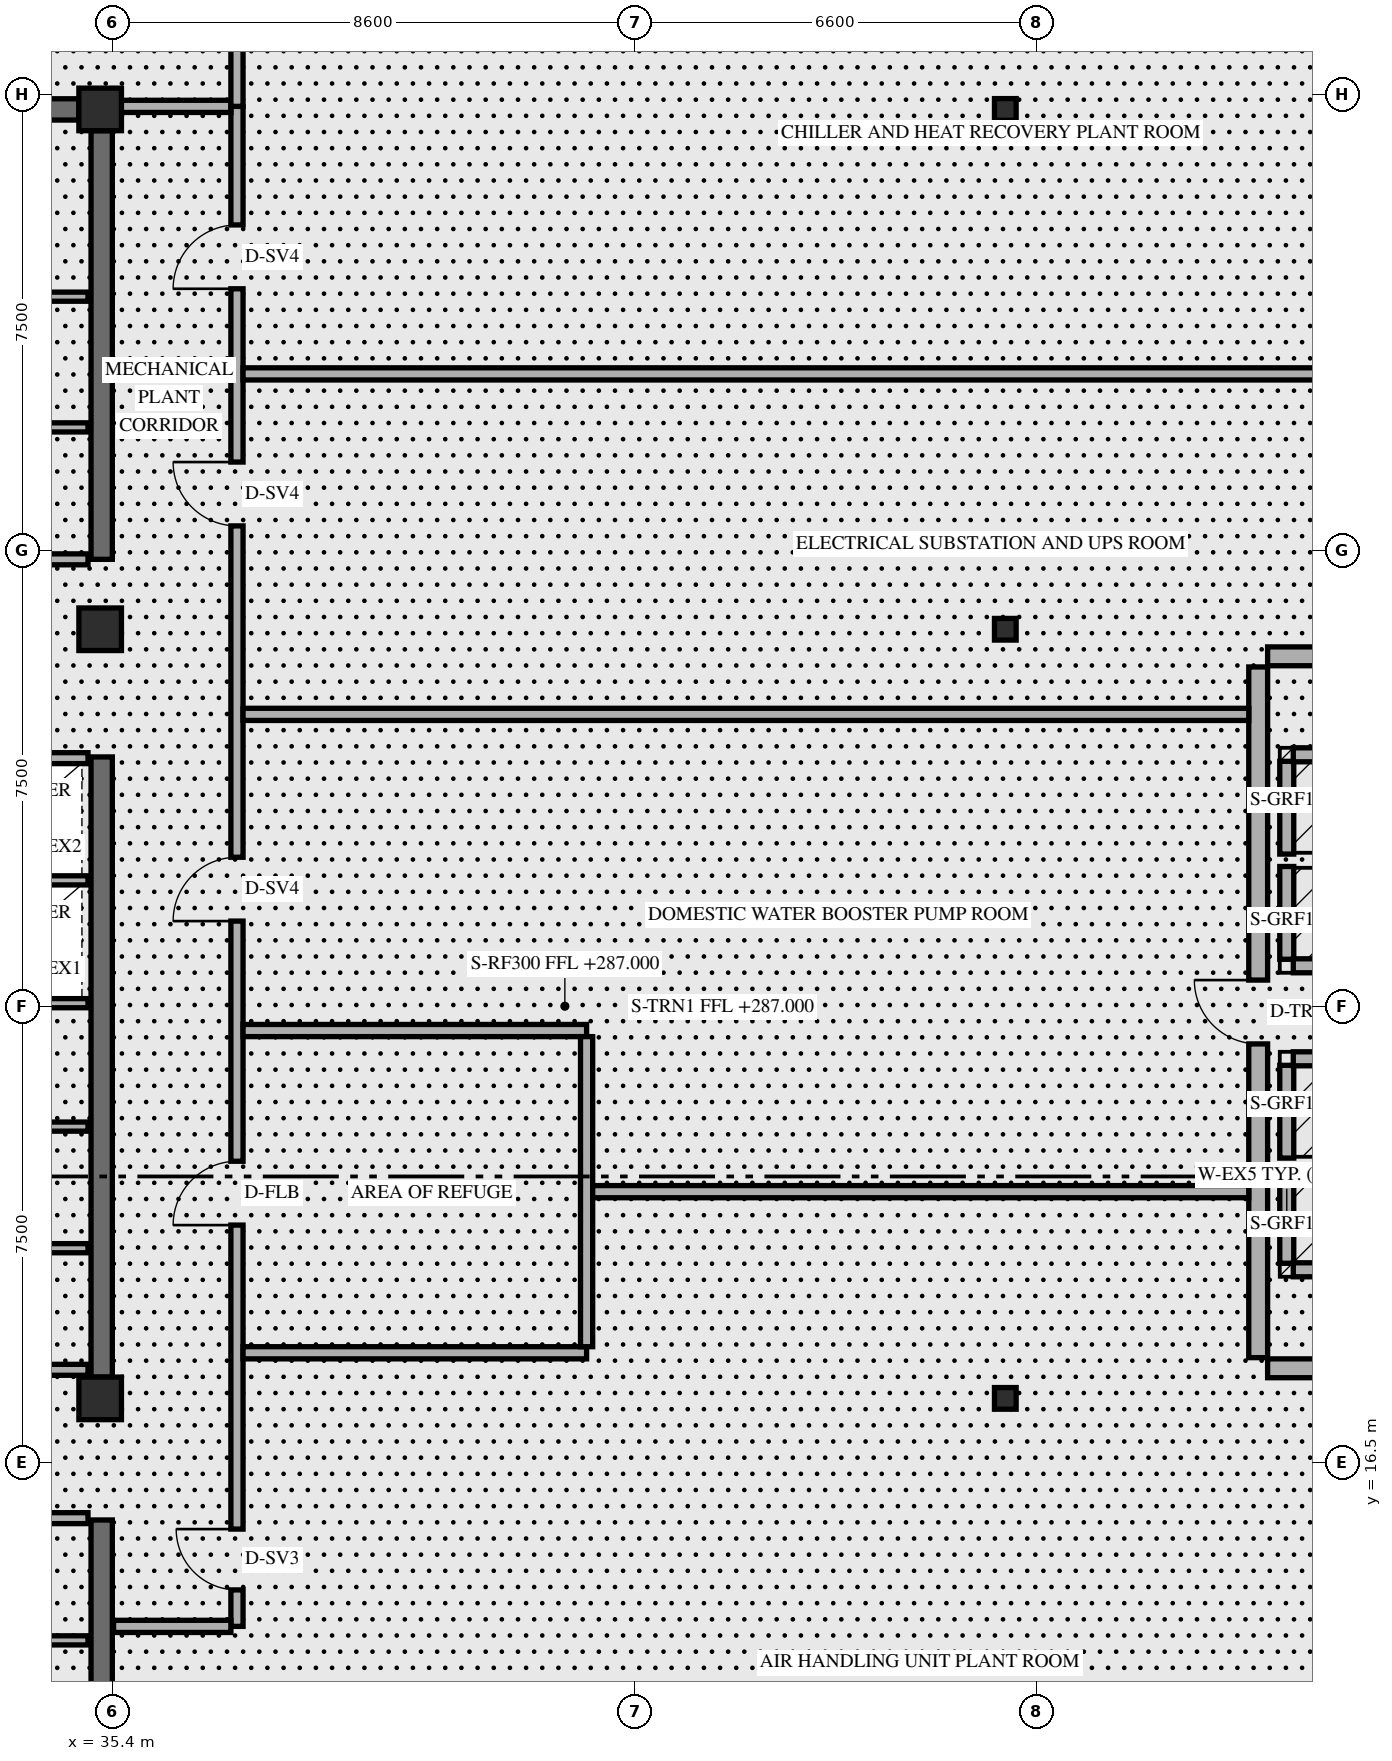
"""IFC4 building model, lengths in metres.
Left out: names, types, materials, properties, quantities, classifications, styles, units other than length and angle.
Written with IfcOpenShell. Run it as: python <this file> out.ifc"""

import sys

from ifc_helpers import new_model, si_unit, direction, frame, frame_2d, origin, origin_2d, place, context, subcontext, project, spatial, rectangle, hollow_rectangle, extrude, element, fill, save


model = new_model("IFC4")
c1 = context("Model", 3, precision=1e-05, world=origin(), true_north=direction((0.0, 1.0)))
c2 = subcontext(c1, "Body", "Model", "MODEL_VIEW")
j1 = project(units=[si_unit("LENGTHUNIT", "METRE"), si_unit("PLANEANGLEUNIT", "RADIAN")], contexts=[c1])
p1 = place(None, origin())
s1 = spatial("IfcSite", under=j1, at=p1, CompositionType="ELEMENT")
p2 = place(p1, origin())
s2 = spatial("IfcBuilding", under=s1, at=p2, CompositionType="ELEMENT")
p3 = place(p2, frame((0.0, 0.0, 287.0)))
s3 = spatial("IfcBuildingStorey", under=s2, at=p3, CompositionType="ELEMENT", Elevation=287.0)
p4 = place(p3, frame((35.225, 9.6, 0.0), z_axis=(0.0, 0.0, 1.0), x_axis=(0.0, 1.0, 0.0)))
e1 = element("IfcWall", 1, at=p4, inside=s3, PredefinedType="SHEAR", context=c2, shape_type="SweptSolid", body=[
    extrude(rectangle(XDim=5.95, YDim=0.35, at=frame_2d((2.975, 0.0))), origin(), (0.0, 0.0, 1.0), 5.161),
])
p5 = place(p3, frame((35.225, 17.9, 0.0), z_axis=(0.0, 0.0, 1.0), x_axis=(0.0, 1.0, 0.0)))
e2 = element("IfcWall", 2, at=p5, inside=s3, PredefinedType="SHEAR", context=c2, shape_type="SweptSolid", body=[
    extrude(rectangle(XDim=10.2, YDim=0.35, at=frame_2d((5.1, 0.0))), origin(), (0.0, 0.0, 1.0), 5.161),
])
p6 = place(p3, frame((35.225, 31.35, 0.0), z_axis=(0.0, 0.0, 1.0), x_axis=(0.0, 1.0, 0.0)))
e3 = element("IfcWall", 3, at=p6, inside=s3, PredefinedType="SHEAR", context=c2, shape_type="SweptSolid", body=[
    extrude(rectangle(XDim=7.05, YDim=0.35, at=frame_2d((3.525, 0.0))), origin(), (0.0, 0.0, 1.0), 5.161),
])
p7 = place(p3, frame((24.55, 38.75, 0.0), z_axis=(0.0, 0.0, 1.0), x_axis=(1.0, 0.0, 0.0)))
e4 = element("IfcWall", 4, at=p7, inside=s3, PredefinedType="SHEAR", context=c2, shape_type="SweptSolid", body=[
    extrude(rectangle(XDim=10.3, YDim=0.35, at=frame_2d((5.15, 0.0))), origin(), (0.0, 0.0, 1.0), 5.7),
])
p8 = place(p7, frame((4.5, 0.0, 0.0)))
e5 = element("IfcOpeningElement", 5, at=p8, cuts=e4, PredefinedType="OPENING", context=c2, shape_type="SweptSolid", body=[
    extrude(rectangle(XDim=1.0, YDim=2.15, at=frame_2d((0.5, 1.075))), frame((0.0, 0.185, 0.0), z_axis=(0.0, -1.0, 0.0), x_axis=(1.0, 0.0, 0.0)), (0.0, 0.0, 1.0), 0.37),
])
for number, where, z_axis, x_axis in (
    (6, (35.2, 17.55, 0.0), (0.0, 0.0, 1.0), (1.0, 0.0, 0.0)),
    (7, (35.2, 30.2, 0.0), (0.0, 0.0, 1.0), (1.0, 0.0, 0.0)),
    (8, (35.2, 38.75, 0.0), (0.0, 0.0, 1.0), (1.0, 0.0, 0.0)),
):
    element("IfcColumn", number, at=place(p3, frame(where, z_axis=z_axis, x_axis=x_axis)), inside=s3, PredefinedType="COLUMN", context=c2, shape_type="SweptSolid", body=[
        extrude(rectangle(XDim=0.7, YDim=0.7, at=origin_2d()), origin(), (0.0, 0.0, 1.0), 5.996),
    ])
for number, where, z_axis, x_axis in (
    (9, (49.981, 17.55, 0.0), (0.035, 0.0, 0.999), (0.0, 1.0, 0.0)),
    (10, (49.981, 30.2, 0.0), (0.035, 0.0, 0.999), (0.0, 1.0, 0.0)),
    (11, (49.981, 38.75, 0.0), (0.035, 0.0, 0.999), (0.0, 1.0, 0.0)),
):
    element("IfcColumn", number, at=place(p3, frame(where, z_axis=z_axis, x_axis=x_axis)), inside=s3, PredefinedType="COLUMN", context=c2, shape_type="SweptSolid", body=[
        extrude(hollow_rectangle(XDim=0.356, YDim=0.356, WallThickness=0.016, at=origin_2d()), origin(), (0.0, 0.0, 1.0), 6.0),
    ])
for number, where, z_axis, x_axis in (
    (12, (54.4, 18.045, 0.0), (0.0, 0.0, 1.0), (1.0, 0.0, 0.0)),
    (13, (54.4, 29.755, 0.0), (0.0, 0.0, 1.0), (1.0, 0.0, 0.0)),
):
    element("IfcWall", number, at=place(p3, frame(where, z_axis=z_axis, x_axis=x_axis)), inside=s3, PredefinedType="SOLIDWALL", context=c2, shape_type="SweptSolid", body=[
        extrude(rectangle(XDim=7.98, YDim=0.31, at=frame_2d((3.99, 0.0))), origin(), (0.0, 0.0, 1.0), 5.219),
    ])
p9 = place(p3, frame((54.245, 18.22, 0.0), z_axis=(0.0, 0.0, 1.0), x_axis=(0.0, 1.0, 0.0)))
e14 = element("IfcWall", 14, at=p9, inside=s3, PredefinedType="SOLIDWALL", context=c2, shape_type="SweptSolid", body=[
    extrude(rectangle(XDim=11.36, YDim=0.31, at=frame_2d((5.68, 0.0))), origin(), (0.0, 0.0, 1.0), 5.7),
])
p10 = place(p9, frame((5.16, 0.0, 0.0)))
e15 = element("IfcOpeningElement", 15, at=p10, cuts=e14, PredefinedType="OPENING", context=c2, shape_type="SweptSolid", body=[
    extrude(rectangle(XDim=1.05, YDim=2.15, at=frame_2d((0.525, 1.075))), frame((0.0, 0.165, 0.0), z_axis=(0.0, -1.0, 0.0), x_axis=(1.0, 0.0, 0.0)), (0.0, 0.0, 1.0), 0.33),
])
for number, where, z_axis, x_axis in (
    (16, (54.715, 19.772, 0.0), (0.0, 0.0, 1.0), (0.0, 1.0, 0.0)),
    (17, (54.715, 21.502, 0.0), (0.0, 0.0, 1.0), (0.0, 1.0, 0.0)),
):
    element("IfcWall", number, at=place(p3, frame(where, z_axis=z_axis, x_axis=x_axis)), inside=s3, PredefinedType="SOLIDWALL", context=c2, shape_type="SweptSolid", body=[
        extrude(rectangle(XDim=1.526, YDim=0.23, at=frame_2d((0.763, 0.0))), origin(), (0.0, 0.0, 1.0), 2.264),
    ])
p11 = place(p3, frame((54.822, 19.665, 0.0), z_axis=(0.0, 0.0, 1.0), x_axis=(1.0, 0.0, 0.0)))
e18 = element("IfcWall", 18, at=p11, inside=s3, PredefinedType="SOLIDWALL", context=c2, shape_type="SweptSolid", body=[
    extrude(rectangle(XDim=3.836, YDim=0.23, at=frame_2d((1.918, 0.0))), origin(), (0.0, 0.0, 1.0), 2.264),
])
p12 = place(p11, frame((1.268, 0.0, 0.78)))
e19 = element("IfcOpeningElement", 19, at=p12, cuts=e18, PredefinedType="OPENING", context=c2, shape_type="SweptSolid", body=[
    extrude(rectangle(XDim=1.3, YDim=1.25, at=frame_2d((0.65, 0.625))), frame((0.0, 0.125, 0.0), z_axis=(0.0, -1.0, 0.0), x_axis=(1.0, 0.0, 0.0)), (0.0, 0.0, 1.0), 0.25),
])
p13 = place(p3, frame((54.822, 23.135, 0.0), z_axis=(0.0, 0.0, 1.0), x_axis=(1.0, 0.0, 0.0)))
e20 = element("IfcWall", 20, at=p13, inside=s3, PredefinedType="SOLIDWALL", context=c2, shape_type="SweptSolid", body=[
    extrude(rectangle(XDim=3.836, YDim=0.23, at=frame_2d((1.918, 0.0))), origin(), (0.0, 0.0, 1.0), 2.264),
])
p14 = place(p13, frame((1.438, 0.0, 0.0)))
e21 = element("IfcOpeningElement", 21, at=p14, cuts=e20, PredefinedType="OPENING", context=c2, shape_type="SweptSolid", body=[
    extrude(rectangle(XDim=0.96, YDim=2.08, at=frame_2d((0.48, 1.04))), frame((0.0, 0.125, 0.0), z_axis=(0.0, -1.0, 0.0), x_axis=(1.0, 0.0, 0.0)), (0.0, 0.0, 1.0), 0.25),
])
for number, where, z_axis, x_axis in (
    (22, (54.715, 24.772, 0.0), (0.0, 0.0, 1.0), (0.0, 1.0, 0.0)),
    (23, (54.715, 26.502, 0.0), (0.0, 0.0, 1.0), (0.0, 1.0, 0.0)),
):
    element("IfcWall", number, at=place(p3, frame(where, z_axis=z_axis, x_axis=x_axis)), inside=s3, PredefinedType="SOLIDWALL", context=c2, shape_type="SweptSolid", body=[
        extrude(rectangle(XDim=1.526, YDim=0.23, at=frame_2d((0.763, 0.0))), origin(), (0.0, 0.0, 1.0), 2.264),
    ])
p15 = place(p3, frame((54.822, 24.665, 0.0), z_axis=(0.0, 0.0, 1.0), x_axis=(1.0, 0.0, 0.0)))
e24 = element("IfcWall", 24, at=p15, inside=s3, PredefinedType="SOLIDWALL", context=c2, shape_type="SweptSolid", body=[
    extrude(rectangle(XDim=3.836, YDim=0.23, at=frame_2d((1.918, 0.0))), origin(), (0.0, 0.0, 1.0), 2.264),
])
p16 = place(p15, frame((1.438, 0.0, 0.0)))
e25 = element("IfcOpeningElement", 25, at=p16, cuts=e24, PredefinedType="OPENING", context=c2, shape_type="SweptSolid", body=[
    extrude(rectangle(XDim=0.96, YDim=2.08, at=frame_2d((0.48, 1.04))), frame((0.0, 0.125, 0.0), z_axis=(0.0, -1.0, 0.0), x_axis=(1.0, 0.0, 0.0)), (0.0, 0.0, 1.0), 0.25),
])
p17 = place(p3, frame((54.822, 28.135, 0.0), z_axis=(0.0, 0.0, 1.0), x_axis=(1.0, 0.0, 0.0)))
e26 = element("IfcWall", 26, at=p17, inside=s3, PredefinedType="SOLIDWALL", context=c2, shape_type="SweptSolid", body=[
    extrude(rectangle(XDim=3.836, YDim=0.23, at=frame_2d((1.918, 0.0))), origin(), (0.0, 0.0, 1.0), 2.264),
])
p18 = place(p17, frame((1.268, 0.0, 0.78)))
e27 = element("IfcOpeningElement", 27, at=p18, cuts=e26, PredefinedType="OPENING", context=c2, shape_type="SweptSolid", body=[
    extrude(rectangle(XDim=1.3, YDim=1.25, at=frame_2d((0.65, 0.625))), frame((0.0, 0.125, 0.0), z_axis=(0.0, -1.0, 0.0), x_axis=(1.0, 0.0, 0.0)), (0.0, 0.0, 1.0), 0.25),
])
p19 = place(p3, frame((32.74, 15.58, 0.0), z_axis=(0.0, 0.0, 1.0), x_axis=(1.0, 0.0, 0.0)))
e28 = element("IfcWall", 28, at=p19, inside=s3, PredefinedType="STANDARD", context=c2, shape_type="SweptSolid", body=[
    extrude(rectangle(XDim=2.26, YDim=0.18, at=frame_2d((1.13, 0.0))), origin(), (0.0, 0.0, 1.0), 5.7),
])
p20 = place(p3, frame((32.74, 13.57, 0.0), z_axis=(0.0, 0.0, 1.0), x_axis=(1.0, 0.0, 0.0)))
e29 = element("IfcWall", 29, at=p20, inside=s3, PredefinedType="STANDARD", context=c2, shape_type="SweptSolid", body=[
    extrude(rectangle(XDim=2.26, YDim=0.15, at=frame_2d((1.13, 0.0))), origin(), (0.0, 0.0, 1.0), 5.7),
])
for number, where, z_axis, x_axis in (
    (30, (32.74, 18.02, 0.0), (0.0, 0.0, 1.0), (1.0, 0.0, 0.0)),
    (31, (32.74, 28.08, 0.0), (0.0, 0.0, 1.0), (1.0, 0.0, 0.0)),
):
    element("IfcWall", number, at=place(p3, frame(where, z_axis=z_axis, x_axis=x_axis)), inside=s3, PredefinedType="STANDARD", context=c2, shape_type="SweptSolid", body=[
        extrude(rectangle(XDim=2.26, YDim=0.18, at=frame_2d((1.13, 0.0))), origin(), (0.0, 0.0, 1.0), 5.7),
    ])
for number, where, z_axis, x_axis in (
    (32, (32.74, 20.02, 0.0), (0.0, 0.0, 1.0), (1.0, 0.0, 0.0)),
    (33, (32.74, 22.02, 0.0), (0.0, 0.0, 1.0), (1.0, 0.0, 0.0)),
    (34, (32.74, 24.05, 0.0), (0.0, 0.0, 1.0), (1.0, 0.0, 0.0)),
    (35, (32.74, 26.07, 0.0), (0.0, 0.0, 1.0), (1.0, 0.0, 0.0)),
):
    element("IfcWall", number, at=place(p3, frame(where, z_axis=z_axis, x_axis=x_axis)), inside=s3, PredefinedType="STANDARD", context=c2, shape_type="SweptSolid", body=[
        extrude(rectangle(XDim=2.26, YDim=0.15, at=frame_2d((1.13, 0.0))), origin(), (0.0, 0.0, 1.0), 5.7),
    ])
p21 = place(p3, frame((32.74, 31.35, 0.0), z_axis=(0.0, 0.0, 1.0), x_axis=(1.0, 0.0, 0.0)))
e36 = element("IfcWall", 36, at=p21, inside=s3, PredefinedType="STANDARD", context=c2, shape_type="SweptSolid", body=[
    extrude(rectangle(XDim=2.26, YDim=0.18, at=frame_2d((1.13, 0.0))), origin(), (0.0, 0.0, 1.0), 5.7),
])
for number, where, z_axis, x_axis in (
    (37, (32.74, 33.52, 0.0), (0.0, 0.0, 1.0), (1.0, 0.0, 0.0)),
    (38, (32.74, 35.67, 0.0), (0.0, 0.0, 1.0), (1.0, 0.0, 0.0)),
):
    element("IfcWall", number, at=place(p3, frame(where, z_axis=z_axis, x_axis=x_axis)), inside=s3, PredefinedType="STANDARD", context=c2, shape_type="SweptSolid", body=[
        extrude(rectangle(XDim=2.26, YDim=0.15, at=frame_2d((1.13, 0.0))), origin(), (0.0, 0.0, 1.0), 5.7),
    ])
p22 = place(p3, frame((37.45, 13.8, 0.0), z_axis=(0.0, 0.0, 1.0), x_axis=(0.0, 1.0, 0.0)))
e39 = element("IfcWall", 39, at=p22, inside=s3, PredefinedType="STANDARD", context=c2, shape_type="SweptSolid", body=[
    extrude(rectangle(XDim=25.0, YDim=0.2, at=frame_2d((12.5, 0.0))), origin(), (0.0, 0.0, 1.0), 5.143),
])
p23 = place(p22, frame((6.6, 0.0, 0.0)))
e40 = element("IfcOpeningElement", 40, at=p23, cuts=e39, PredefinedType="OPENING", context=c2, shape_type="SweptSolid", body=[
    extrude(rectangle(XDim=1.05, YDim=2.15, at=frame_2d((0.525, 1.075))), frame((0.0, 0.11, 0.0), z_axis=(0.0, -1.0, 0.0), x_axis=(1.0, 0.0, 0.0)), (0.0, 0.0, 1.0), 0.22),
])
p24 = place(p22, frame((0.6, 0.0, 0.0)))
e41 = element("IfcOpeningElement", 41, at=p24, cuts=e39, PredefinedType="OPENING", context=c2, shape_type="SweptSolid", body=[
    extrude(rectangle(XDim=1.0, YDim=2.15, at=frame_2d((0.5, 1.075))), frame((0.0, 0.11, 0.0), z_axis=(0.0, -1.0, 0.0), x_axis=(1.0, 0.0, 0.0)), (0.0, 0.0, 1.0), 0.22),
])
p25 = place(p22, frame((11.6, 0.0, 0.0)))
e42 = element("IfcOpeningElement", 42, at=p25, cuts=e39, PredefinedType="OPENING", context=c2, shape_type="SweptSolid", body=[
    extrude(rectangle(XDim=1.05, YDim=2.15, at=frame_2d((0.525, 1.075))), frame((0.0, 0.11, 0.0), z_axis=(0.0, -1.0, 0.0), x_axis=(1.0, 0.0, 0.0)), (0.0, 0.0, 1.0), 0.22),
])
p26 = place(p22, frame((18.1, 0.0, 0.0)))
e43 = element("IfcOpeningElement", 43, at=p26, cuts=e39, PredefinedType="OPENING", context=c2, shape_type="SweptSolid", body=[
    extrude(rectangle(XDim=1.05, YDim=2.15, at=frame_2d((0.525, 1.075))), frame((0.0, 0.11, 0.0), z_axis=(0.0, -1.0, 0.0), x_axis=(1.0, 0.0, 0.0)), (0.0, 0.0, 1.0), 0.22),
])
p27 = place(p22, frame((22.0, 0.0, 0.0)))
e44 = element("IfcOpeningElement", 44, at=p27, cuts=e39, PredefinedType="OPENING", context=c2, shape_type="SweptSolid", body=[
    extrude(rectangle(XDim=1.05, YDim=2.15, at=frame_2d((0.525, 1.075))), frame((0.0, 0.11, 0.0), z_axis=(0.0, -1.0, 0.0), x_axis=(1.0, 0.0, 0.0)), (0.0, 0.0, 1.0), 0.22),
])
p28 = place(p3, frame((35.42, 13.8, 0.0), z_axis=(0.0, 0.0, 1.0), x_axis=(1.0, 0.0, 0.0)))
e45 = element("IfcWall", 45, at=p28, inside=s3, PredefinedType="STANDARD", context=c2, shape_type="SweptSolid", body=[
    extrude(rectangle(XDim=1.93, YDim=0.2, at=frame_2d((0.965, 0.0))), origin(), (0.0, 0.0, 1.0), 5.379),
])
p29 = place(p3, frame((35.42, 38.8, 0.0), z_axis=(0.0, 0.0, 1.0), x_axis=(1.0, 0.0, 0.0)))
e46 = element("IfcWall", 46, at=p29, inside=s3, PredefinedType="STANDARD", context=c2, shape_type="SweptSolid", body=[
    extrude(rectangle(XDim=1.93, YDim=0.2, at=frame_2d((0.965, 0.0))), origin(), (0.0, 0.0, 1.0), 5.143),
])
for number, where, z_axis, x_axis in (
    (47, (37.55, 18.3, 0.0), (0.0, 0.0, 1.0), (1.0, 0.0, 0.0)),
    (48, (37.55, 23.6, 0.0), (0.0, 0.0, 1.0), (1.0, 0.0, 0.0)),
):
    element("IfcWall", number, at=place(p3, frame(where, z_axis=z_axis, x_axis=x_axis)), inside=s3, PredefinedType="STANDARD", context=c2, shape_type="SweptSolid", body=[
        extrude(rectangle(XDim=5.65, YDim=0.2, at=frame_2d((2.825, 0.0))), origin(), (0.0, 0.0, 1.0), 5.7),
    ])
p30 = place(p3, frame((43.2, 18.4, 0.0), z_axis=(0.0, 0.0, 1.0), x_axis=(0.0, 1.0, 0.0)))
e49 = element("IfcWall", 49, at=p30, inside=s3, PredefinedType="STANDARD", context=c2, shape_type="SweptSolid", body=[
    extrude(rectangle(XDim=5.1, YDim=0.2, at=frame_2d((2.55, 0.0))), origin(), (0.0, 0.0, 1.0), 5.7),
])
p31 = place(p3, frame((43.3, 20.95, 0.0), z_axis=(0.0, 0.0, 1.0), x_axis=(1.0, 0.0, 0.0)))
e50 = element("IfcWall", 50, at=p31, inside=s3, PredefinedType="STANDARD", context=c2, shape_type="SweptSolid", body=[
    extrude(rectangle(XDim=10.79, YDim=0.2, at=frame_2d((5.395, 0.0))), origin(), (0.0, 0.0, 1.0), 5.143),
])
p32 = place(p3, frame((37.55, 28.8, 0.0), z_axis=(0.0, 0.0, 1.0), x_axis=(1.0, 0.0, 0.0)))
e51 = element("IfcWall", 51, at=p32, inside=s3, PredefinedType="STANDARD", context=c2, shape_type="SweptSolid", body=[
    extrude(rectangle(XDim=16.54, YDim=0.2, at=frame_2d((8.27, 0.0))), origin(), (0.0, 0.0, 1.0), 5.143),
])
p33 = place(p3, frame((37.55, 34.4, 0.0), z_axis=(0.0, 0.0, 1.0), x_axis=(1.0, 0.0, 0.0)))
e52 = element("IfcWall", 52, at=p33, inside=s3, PredefinedType="STANDARD", context=c2, shape_type="SweptSolid", body=[
    extrude(rectangle(XDim=24.54, YDim=0.2, at=frame_2d((12.27, 0.0))), origin(), (0.0, 0.0, 1.0), 5.143),
])
p34 = place(p3, frame((37.45, 38.8, 0.0), z_axis=(0.0, 0.0, 1.0), x_axis=(0.0, 1.0, 0.0)))
e53 = element("IfcWall", 53, at=p34, inside=s3, PredefinedType="STANDARD", context=c2, shape_type="SweptSolid", body=[
    extrude(rectangle(XDim=3.39, YDim=0.2, at=frame_2d((1.695, 0.0))), origin(), (0.0, 0.0, 1.0), 5.143),
])
p35 = place(p10, origin())
e54 = element("IfcDoor", 54, at=p35, inside=s3, OperationType="SINGLE_SWING_RIGHT", PredefinedType="DOOR", context=c2, shape_type="SweptSolid", body=[
    extrude(rectangle(XDim=1.05, YDim=2.15, at=frame_2d((0.525, 1.075))), frame((0.0, 0.025, 0.0), z_axis=(0.0, -1.0, 0.0), x_axis=(1.0, 0.0, 0.0)), (0.0, 0.0, 1.0), 0.05),
])
fill(e15, e54)
p36 = place(p23, origin())
e55 = element("IfcDoor", 55, at=p36, inside=s3, OperationType="SINGLE_SWING_LEFT", PredefinedType="DOOR", context=c2, shape_type="SweptSolid", body=[
    extrude(rectangle(XDim=1.05, YDim=2.15, at=frame_2d((0.525, 1.075))), frame((0.0, 0.025, 0.0), z_axis=(0.0, -1.0, 0.0), x_axis=(1.0, 0.0, 0.0)), (0.0, 0.0, 1.0), 0.05),
])
fill(e40, e55)
p37 = place(p24, origin())
e56 = element("IfcDoor", 56, at=p37, inside=s3, OperationType="SINGLE_SWING_RIGHT", PredefinedType="DOOR", context=c2, shape_type="SweptSolid", body=[
    extrude(rectangle(XDim=1.0, YDim=2.15, at=frame_2d((0.5, 1.075))), frame((0.0, 0.025, 0.0), z_axis=(0.0, -1.0, 0.0), x_axis=(1.0, 0.0, 0.0)), (0.0, 0.0, 1.0), 0.05),
])
fill(e41, e56)
p38 = place(p25, origin())
e57 = element("IfcDoor", 57, at=p38, inside=s3, OperationType="SINGLE_SWING_LEFT", PredefinedType="DOOR", context=c2, shape_type="SweptSolid", body=[
    extrude(rectangle(XDim=1.05, YDim=2.15, at=frame_2d((0.525, 1.075))), frame((0.0, 0.025, 0.0), z_axis=(0.0, -1.0, 0.0), x_axis=(1.0, 0.0, 0.0)), (0.0, 0.0, 1.0), 0.05),
])
fill(e42, e57)
p39 = place(p26, origin())
e58 = element("IfcDoor", 58, at=p39, inside=s3, OperationType="SINGLE_SWING_RIGHT", PredefinedType="DOOR", context=c2, shape_type="SweptSolid", body=[
    extrude(rectangle(XDim=1.05, YDim=2.15, at=frame_2d((0.525, 1.075))), frame((0.0, 0.025, 0.0), z_axis=(0.0, -1.0, 0.0), x_axis=(1.0, 0.0, 0.0)), (0.0, 0.0, 1.0), 0.05),
])
fill(e43, e58)
p40 = place(p27, origin())
e59 = element("IfcDoor", 59, at=p40, inside=s3, OperationType="SINGLE_SWING_LEFT", PredefinedType="DOOR", context=c2, shape_type="SweptSolid", body=[
    extrude(rectangle(XDim=1.05, YDim=2.15, at=frame_2d((0.525, 1.075))), frame((0.0, 0.025, 0.0), z_axis=(0.0, -1.0, 0.0), x_axis=(1.0, 0.0, 0.0)), (0.0, 0.0, 1.0), 0.05),
])
fill(e44, e59)
save(model, sys.argv[1])
